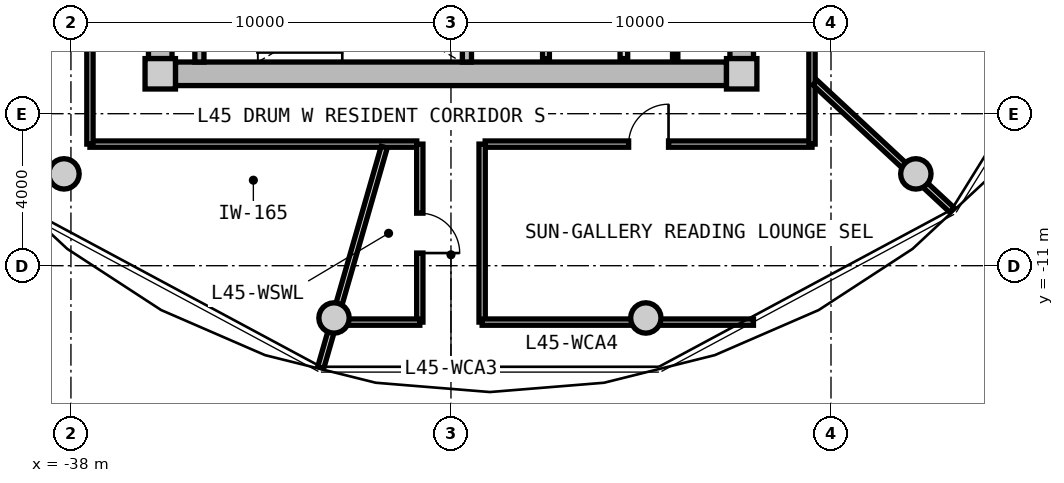
"""IFC4 building model, lengths in metres.
Left out: names, types, materials, properties, quantities, classifications, styles, units other than length and angle.
Written with IfcOpenShell. Run it as: python <this file> out.ifc"""

import sys

from ifc_helpers import new_model, si_unit, direction, frame, frame_2d, origin, origin_2d, place, context, subcontext, project, spatial, rectangle, circle, extrude, source, transform, mapped, element, fill, save


model = new_model("IFC4")
c1 = context("Model", 3, precision=1e-05, world=origin(), true_north=direction((0.0, 1.0)))
c2 = subcontext(c1, "Body", "Model", "MODEL_VIEW")
j1 = project(units=[si_unit("LENGTHUNIT", "METRE"), si_unit("PLANEANGLEUNIT", "RADIAN")], contexts=[c1])
p1 = place(None, origin())
s1 = spatial("IfcSite", under=j1, at=p1, CompositionType="ELEMENT")
p2 = place(p1, origin())
s2 = spatial("IfcBuilding", under=s1, at=p2, CompositionType="ELEMENT")
p3 = place(p2, frame((0.0, 0.0, 146.5)))
s3 = spatial("IfcBuildingStorey", under=s2, at=p3, CompositionType="ELEMENT", Elevation=146.5)
m1 = source(origin(), c2, "Body", "SweptSolid", [
    extrude(rectangle(XDim=0.8, YDim=0.8, at=origin_2d()), origin(), (0.0, 0.0, 1.0), 3.05),
])
for number, where, z_axis, x_axis in (
    (1, (-35.65, -5.95, 0.0), (0.0, 0.0, 1.0), (1.0, 0.0, 0.0)),
    (2, (-20.35, -5.95, 0.0), (0.0, 0.0, 1.0), (1.0, 0.0, 0.0)),
):
    element("IfcColumn", number, at=place(p3, frame(where, z_axis=z_axis, x_axis=x_axis)), inside=s3, PredefinedType="COLUMN", context=c2, shape_type="MappedRepresentation", body=[
        mapped(m1, transform((0.0, 0.0, 0.0), x_axis=(1.0, 0.0, 0.0), y_axis=(0.0, 1.0, 0.0), z_axis=(0.0, 0.0, 1.0), scale=1.0)),
    ])
m2 = source(origin(), c2, "Body", "SweptSolid", [
    extrude(rectangle(XDim=14.5, YDim=0.62, at=frame_2d((7.25, 0.0))), origin(), (0.0, 0.0, 1.0), 2.81),
])
p4 = place(p3, frame((-20.75, -5.95, 0.0), z_axis=(0.0, 0.0, 1.0), x_axis=(-1.0, 0.0, 0.0)))
e3 = element("IfcWall", 3, at=p4, inside=s3, PredefinedType="SHEAR", context=c2, shape_type="MappedRepresentation", body=[
    mapped(m2, transform((0.0, 0.0, 0.0), x_axis=(1.0, 0.0, 0.0), y_axis=(0.0, 1.0, 0.0), z_axis=(0.0, 0.0, 1.0), scale=1.0)),
])
m3 = source(origin(), c2, "Body", "SweptSolid", [
    extrude(rectangle(XDim=11.1, YDim=0.62, at=frame_2d((5.55, 0.0))), origin(), (0.0, 0.0, 1.0), 2.81),
])
p5 = place(p3, frame((-35.65, -5.55, 0.0), z_axis=(0.0, 0.0, 1.0), x_axis=(0.0, 1.0, 0.0)))
e4 = element("IfcWall", 4, at=p5, inside=s3, PredefinedType="SHEAR", context=c2, shape_type="MappedRepresentation", body=[
    mapped(m3, transform((0.0, 0.0, 0.0), x_axis=(1.0, 0.0, 0.0), y_axis=(0.0, 1.0, 0.0), z_axis=(0.0, 0.0, 1.0), scale=1.0)),
])
p6 = place(p5, frame((3.8, 0.0, 0.0)))
e5 = element("IfcOpeningElement", 5, at=p6, cuts=e4, PredefinedType="OPENING", context=c2, shape_type="SweptSolid", body=[
    extrude(rectangle(XDim=1.2, YDim=2.15, at=frame_2d((0.6, 1.075))), frame((0.0, 0.32, 0.0), z_axis=(0.0, -1.0, 0.0), x_axis=(1.0, 0.0, 0.0)), (0.0, 0.0, 1.0), 0.64),
])
p7 = place(p3, frame((-20.35, 5.55, 0.0), z_axis=(0.0, 0.0, 1.0), x_axis=(0.0, -1.0, 0.0)))
e6 = element("IfcWall", 6, at=p7, inside=s3, PredefinedType="SHEAR", context=c2, shape_type="MappedRepresentation", body=[
    mapped(m3, transform((0.0, 0.0, 0.0), x_axis=(1.0, 0.0, 0.0), y_axis=(0.0, 1.0, 0.0), z_axis=(0.0, 0.0, 1.0), scale=1.0)),
])
p8 = place(p7, frame((5.65, 0.0, 0.0)))
e7 = element("IfcOpeningElement", 7, at=p8, cuts=e6, PredefinedType="OPENING", context=c2, shape_type="SweptSolid", body=[
    extrude(rectangle(XDim=1.2, YDim=2.15, at=frame_2d((0.6, 1.075))), frame((0.0, 0.32, 0.0), z_axis=(0.0, -1.0, 0.0), x_axis=(1.0, 0.0, 0.0)), (0.0, 0.0, 1.0), 0.64),
])
m4 = source(origin(), c2, "Body", "SweptSolid", [
    extrude(circle(Radius=0.4, at=origin_2d()), origin(), (0.0, 0.0, 1.0), 3.05),
])
for number, where, z_axis, x_axis in (
    (8, (-38.183, -8.584, 0.0), (0.0, 0.0, 1.0), (1.0, 0.0, 0.0)),
    (9, (-31.077, -12.375, 0.0), (0.0, 0.0, 1.0), (1.0, 0.0, 0.0)),
    (10, (-22.873, -12.375, 0.0), (0.0, 0.0, 1.0), (1.0, 0.0, 0.0)),
    (11, (-15.767, -8.584, 0.0), (0.0, 0.0, 1.0), (1.0, 0.0, 0.0)),
):
    element("IfcColumn", number, at=place(p3, frame(where, z_axis=z_axis, x_axis=x_axis)), inside=s3, PredefinedType="COLUMN", context=c2, shape_type="MappedRepresentation", body=[
        mapped(m4, transform((0.0, 0.0, 0.0), x_axis=(1.0, 0.0, 0.0), y_axis=(0.0, 1.0, 0.0), z_axis=(0.0, 0.0, 1.0), scale=1.0)),
    ])
m5 = source(origin(), c2, "Body", "SweptSolid", [
    extrude(rectangle(XDim=3.19, YDim=0.24, at=frame_2d((1.595, 0.0))), origin(), (0.0, 0.0, 1.0), 2.81),
])
for number, where, z_axis, x_axis in (
    (12, (-34.62, -5.64, 0.0), (0.0, 0.0, 1.0), (0.0, 1.0, 0.0)),
    (13, (-27.58, -5.64, 0.0), (0.0, 0.0, 1.0), (0.0, 1.0, 0.0)),
):
    element("IfcWall", number, at=place(p3, frame(where, z_axis=z_axis, x_axis=x_axis)), inside=s3, PredefinedType="PARTITIONING", context=c2, shape_type="MappedRepresentation", body=[
        mapped(m5, transform((0.0, 0.0, 0.0), x_axis=(1.0, 0.0, 0.0), y_axis=(0.0, 1.0, 0.0), z_axis=(0.0, 0.0, 1.0), scale=1.0)),
    ])
m6 = source(origin(), c2, "Body", "SweptSolid", [
    extrude(rectangle(XDim=3.8, YDim=0.2, at=frame_2d((1.9, 0.0))), origin(), (0.0, 0.0, 1.0), 2.795),
])
p9 = place(p3, frame((-23.45, -5.55, 0.0), z_axis=(0.0, 0.0, 1.0), x_axis=(0.0, 1.0, 0.0)))
e14 = element("IfcWall", 14, at=p9, inside=s3, PredefinedType="PARTITIONING", context=c2, shape_type="MappedRepresentation", body=[
    mapped(m6, transform((0.0, 0.0, 0.0), x_axis=(1.0, 0.0, 0.0), y_axis=(0.0, 1.0, 0.0), z_axis=(0.0, 0.0, 1.0), scale=1.0)),
])
m7 = source(origin(), c2, "Body", "SweptSolid", [
    extrude(rectangle(XDim=3.22, YDim=0.18, at=frame_2d((1.61, 0.0))), origin(), (0.0, 0.0, 1.0), 2.795),
])
p10 = place(p3, frame((-25.5, -5.55, 0.0), z_axis=(0.0, 0.0, 1.0), x_axis=(0.0, 1.0, 0.0)))
e15 = element("IfcWall", 15, at=p10, inside=s3, PredefinedType="PARTITIONING", context=c2, shape_type="MappedRepresentation", body=[
    mapped(m7, transform((0.0, 0.0, 0.0), x_axis=(1.0, 0.0, 0.0), y_axis=(0.0, 1.0, 0.0), z_axis=(0.0, 0.0, 1.0), scale=1.0)),
])
m8 = source(origin(), c2, "Body", "SweptSolid", [
    extrude(rectangle(XDim=3.8, YDim=0.14, at=frame_2d((1.9, 0.0))), origin(), (0.0, 0.0, 1.0), 2.795),
])
p11 = place(p3, frame((-22.1, -5.55, 0.0), z_axis=(0.0, 0.0, 1.0), x_axis=(0.0, 1.0, 0.0)))
e16 = element("IfcWall", 16, at=p11, inside=s3, PredefinedType="PARTITIONING", context=c2, shape_type="MappedRepresentation", body=[
    mapped(m8, transform((0.0, 0.0, 0.0), x_axis=(1.0, 0.0, 0.0), y_axis=(0.0, 1.0, 0.0), z_axis=(0.0, 0.0, 1.0), scale=1.0)),
])
m9 = source(origin(), c2, "Body", "SweptSolid", [
    extrude(rectangle(XDim=8.6, YDim=0.165, at=frame_2d((4.3, 0.0))), origin(), (0.0, 0.0, 1.0), 2.795),
])
p12 = place(p3, frame((-18.5, -7.8, 0.0), z_axis=(0.0, 0.0, 1.0), x_axis=(-1.0, 0.0, 0.0)))
e17 = element("IfcWall", 17, at=p12, inside=s3, PredefinedType="PARTITIONING", context=c2, shape_type="MappedRepresentation", body=[
    mapped(m9, transform((0.0, 0.0, 0.0), x_axis=(1.0, 0.0, 0.0), y_axis=(0.0, 1.0, 0.0), z_axis=(0.0, 0.0, 1.0), scale=1.0)),
])
p13 = place(p12, frame((3.775, 0.0, 0.0)))
e18 = element("IfcOpeningElement", 18, at=p13, cuts=e17, PredefinedType="OPENING", context=c2, shape_type="SweptSolid", body=[
    extrude(rectangle(XDim=1.05, YDim=2.15, at=frame_2d((0.525, 1.075))), frame((0.0, 0.093, 0.0), z_axis=(0.0, -1.0, 0.0), x_axis=(1.0, 0.0, 0.0)), (0.0, 0.0, 1.0), 0.185),
])
p14 = place(p3, frame((-28.9, -7.8, 0.0), z_axis=(0.0, 0.0, 1.0), x_axis=(-1.0, 0.0, 0.0)))
e19 = element("IfcWall", 19, at=p14, inside=s3, PredefinedType="PARTITIONING", context=c2, shape_type="MappedRepresentation", body=[
    mapped(m9, transform((0.0, 0.0, 0.0), x_axis=(1.0, 0.0, 0.0), y_axis=(0.0, 1.0, 0.0), z_axis=(0.0, 0.0, 1.0), scale=1.0)),
])
m10 = source(origin(), c2, "Body", "SweptSolid", [
    extrude(rectangle(XDim=15.6, YDim=0.165, at=frame_2d((7.8, 0.0))), origin(), (0.0, 0.0, 1.0), 2.795),
])
p15 = place(p3, frame((-37.5, -7.8, 0.0), z_axis=(0.0, 0.0, 1.0), x_axis=(0.0, 1.0, 0.0)))
e20 = element("IfcWall", 20, at=p15, inside=s3, PredefinedType="PARTITIONING", context=c2, shape_type="MappedRepresentation", body=[
    mapped(m10, transform((0.0, 0.0, 0.0), x_axis=(1.0, 0.0, 0.0), y_axis=(0.0, 1.0, 0.0), z_axis=(0.0, 0.0, 1.0), scale=1.0)),
])
p16 = place(p15, frame((13.325, 0.0, 0.0)))
e21 = element("IfcOpeningElement", 21, at=p16, cuts=e20, PredefinedType="OPENING", context=c2, shape_type="SweptSolid", body=[
    extrude(rectangle(XDim=0.92, YDim=2.1, at=frame_2d((0.46, 1.05))), frame((0.0, 0.093, 0.0), z_axis=(0.0, -1.0, 0.0), x_axis=(1.0, 0.0, 0.0)), (0.0, 0.0, 1.0), 0.185),
])
p17 = place(p15, frame((5.628, 0.0, 0.0)))
e22 = element("IfcOpeningElement", 22, at=p17, cuts=e20, PredefinedType="OPENING", context=c2, shape_type="SweptSolid", body=[
    extrude(rectangle(XDim=1.25, YDim=2.2, at=frame_2d((0.625, 1.1))), frame((0.0, 0.093, 0.0), z_axis=(0.0, -1.0, 0.0), x_axis=(1.0, 0.0, 0.0)), (0.0, 0.0, 1.0), 0.185),
])
p18 = place(p3, frame((-18.5, 7.8, 0.0), z_axis=(0.0, 0.0, 1.0), x_axis=(0.0, -1.0, 0.0)))
e23 = element("IfcWall", 23, at=p18, inside=s3, PredefinedType="PARTITIONING", context=c2, shape_type="MappedRepresentation", body=[
    mapped(m10, transform((0.0, 0.0, 0.0), x_axis=(1.0, 0.0, 0.0), y_axis=(0.0, 1.0, 0.0), z_axis=(0.0, 0.0, 1.0), scale=1.0)),
])
p19 = place(p18, frame((8.314, 0.0, 0.0)))
e24 = element("IfcOpeningElement", 24, at=p19, cuts=e23, PredefinedType="OPENING", context=c2, shape_type="SweptSolid", body=[
    extrude(rectangle(XDim=1.25, YDim=2.2, at=frame_2d((0.625, 1.1))), frame((0.0, 0.093, 0.0), z_axis=(0.0, -1.0, 0.0), x_axis=(1.0, 0.0, 0.0)), (0.0, 0.0, 1.0), 0.185),
])
p20 = place(p18, frame((1.515, 0.0, 0.0)))
e25 = element("IfcOpeningElement", 25, at=p20, cuts=e23, PredefinedType="OPENING", context=c2, shape_type="SweptSolid", body=[
    extrude(rectangle(XDim=1.05, YDim=2.15, at=frame_2d((0.525, 1.075))), frame((0.0, 0.093, 0.0), z_axis=(0.0, -1.0, 0.0), x_axis=(1.0, 0.0, 0.0)), (0.0, 0.0, 1.0), 0.185),
])
m11 = source(origin(), c2, "Body", "SweptSolid", [
    extrude(rectangle(XDim=6.035, YDim=0.165, at=frame_2d((3.018, 0.0))), origin(), (0.0, 0.0, 1.0), 2.345),
])
p21 = place(p3, frame((-29.756, -7.88, 0.0), z_axis=(0.0, 0.0, 1.0), x_axis=(-0.276809454862, -0.960924828329, 0.0)))
e26 = element("IfcWall", 26, at=p21, inside=s3, PredefinedType="PARTITIONING", context=c2, shape_type="MappedRepresentation", body=[
    mapped(m11, transform((0.0, 0.0, 0.0), x_axis=(1.0, 0.0, 0.0), y_axis=(0.0, 1.0, 0.0), z_axis=(0.0, 0.0, 1.0), scale=1.0)),
])
m12 = source(origin(), c2, "Body", "SweptSolid", [
    extrude(rectangle(XDim=4.927, YDim=0.165, at=frame_2d((2.463, 0.0))), origin(), (0.0, 0.0, 1.0), 2.345),
])
p22 = place(p3, frame((-18.42, -6.183, 0.0), z_axis=(0.0, 0.0, 1.0), x_axis=(0.732191335987, -0.681098999783, 0.0)))
e27 = element("IfcWall", 27, at=p22, inside=s3, PredefinedType="PARTITIONING", context=c2, shape_type="MappedRepresentation", body=[
    mapped(m12, transform((0.0, 0.0, 0.0), x_axis=(1.0, 0.0, 0.0), y_axis=(0.0, 1.0, 0.0), z_axis=(0.0, 0.0, 1.0), scale=1.0)),
])
m13 = source(origin(), c2, "Body", "SweptSolid", [
    extrude(rectangle(XDim=4.685, YDim=0.165, at=frame_2d((2.342, 0.0))), origin(), (0.0, 0.0, 1.0), 2.795),
])
p23 = place(p3, frame((-28.82, -12.485, 0.0), z_axis=(0.0, 0.0, 1.0), x_axis=(0.0, 1.0, 0.0)))
e28 = element("IfcWall", 28, at=p23, inside=s3, PredefinedType="PARTITIONING", context=c2, shape_type="MappedRepresentation", body=[
    mapped(m13, transform((0.0, 0.0, 0.0), x_axis=(1.0, 0.0, 0.0), y_axis=(0.0, 1.0, 0.0), z_axis=(0.0, 0.0, 1.0), scale=1.0)),
])
p24 = place(p23, frame((1.817, 0.0, 0.0)))
e29 = element("IfcOpeningElement", 29, at=p24, cuts=e28, PredefinedType="OPENING", context=c2, shape_type="SweptSolid", body=[
    extrude(rectangle(XDim=1.05, YDim=2.15, at=frame_2d((0.525, 1.075))), frame((0.0, 0.093, 0.0), z_axis=(0.0, -1.0, 0.0), x_axis=(1.0, 0.0, 0.0)), (0.0, 0.0, 1.0), 0.185),
])
m14 = source(origin(), c2, "Body", "SweptSolid", [
    extrude(rectangle(XDim=2.419, YDim=0.165, at=frame_2d((1.209, 0.0))), origin(), (0.0, 0.0, 1.0), 2.345),
])
p25 = place(p3, frame((-31.239, -12.485, 0.0), z_axis=(0.0, 0.0, 1.0), x_axis=(1.0, 0.0, 0.0)))
e30 = element("IfcWall", 30, at=p25, inside=s3, PredefinedType="PARTITIONING", context=c2, shape_type="MappedRepresentation", body=[
    mapped(m14, transform((0.0, 0.0, 0.0), x_axis=(1.0, 0.0, 0.0), y_axis=(0.0, 1.0, 0.0), z_axis=(0.0, 0.0, 1.0), scale=1.0)),
])
p26 = place(p3, frame((-27.18, -12.485, 0.0), z_axis=(0.0, 0.0, 1.0), x_axis=(0.0, 1.0, 0.0)))
e31 = element("IfcWall", 31, at=p26, inside=s3, PredefinedType="PARTITIONING", context=c2, shape_type="MappedRepresentation", body=[
    mapped(m13, transform((0.0, 0.0, 0.0), x_axis=(1.0, 0.0, 0.0), y_axis=(0.0, 1.0, 0.0), z_axis=(0.0, 0.0, 1.0), scale=1.0)),
])
m15 = source(origin(), c2, "Body", "SweptSolid", [
    extrude(rectangle(XDim=7.139, YDim=0.165, at=frame_2d((3.569, 0.0))), origin(), (0.0, 0.0, 1.0), 2.345),
])
p27 = place(p3, frame((-27.18, -12.485, 0.0), z_axis=(0.0, 0.0, 1.0), x_axis=(1.0, 0.0, 0.0)))
e32 = element("IfcWall", 32, at=p27, inside=s3, PredefinedType="PARTITIONING", context=c2, shape_type="MappedRepresentation", body=[
    mapped(m15, transform((0.0, 0.0, 0.0), x_axis=(1.0, 0.0, 0.0), y_axis=(0.0, 1.0, 0.0), z_axis=(0.0, 0.0, 1.0), scale=1.0)),
])
m16 = source(origin(), c2, "Body", "SweptSolid", [
    extrude(rectangle(XDim=1.05, YDim=2.15, at=frame_2d((0.525, 1.075))), frame((0.0, 0.025, 0.0), z_axis=(0.0, -1.0, 0.0), x_axis=(1.0, 0.0, 0.0)), (0.0, 0.0, 1.0), 0.05),
])
p28 = place(p24, frame((1.05, 0.0, 0.0), z_axis=(0.0, 0.0, 1.0), x_axis=(-1.0, 0.0, 0.0)))
e33 = element("IfcDoor", 33, at=p28, inside=s3, OperationType="SINGLE_SWING_RIGHT", PredefinedType="DOOR", context=c2, shape_type="MappedRepresentation", body=[
    mapped(m16, transform((0.0, 0.0, 0.0), x_axis=(1.0, 0.0, 0.0), y_axis=(0.0, 1.0, 0.0), z_axis=(0.0, 0.0, 1.0), scale=1.0)),
])
fill(e29, e33)
p29 = place(p13, frame((1.05, 0.0, 0.0), z_axis=(0.0, 0.0, 1.0), x_axis=(-1.0, 0.0, 0.0)))
e34 = element("IfcDoor", 34, at=p29, inside=s3, OperationType="SINGLE_SWING_RIGHT", PredefinedType="DOOR", context=c2, shape_type="MappedRepresentation", body=[
    mapped(m16, transform((0.0, 0.0, 0.0), x_axis=(1.0, 0.0, 0.0), y_axis=(0.0, 1.0, 0.0), z_axis=(0.0, 0.0, 1.0), scale=1.0)),
])
fill(e18, e34)
save(model, sys.argv[1])
